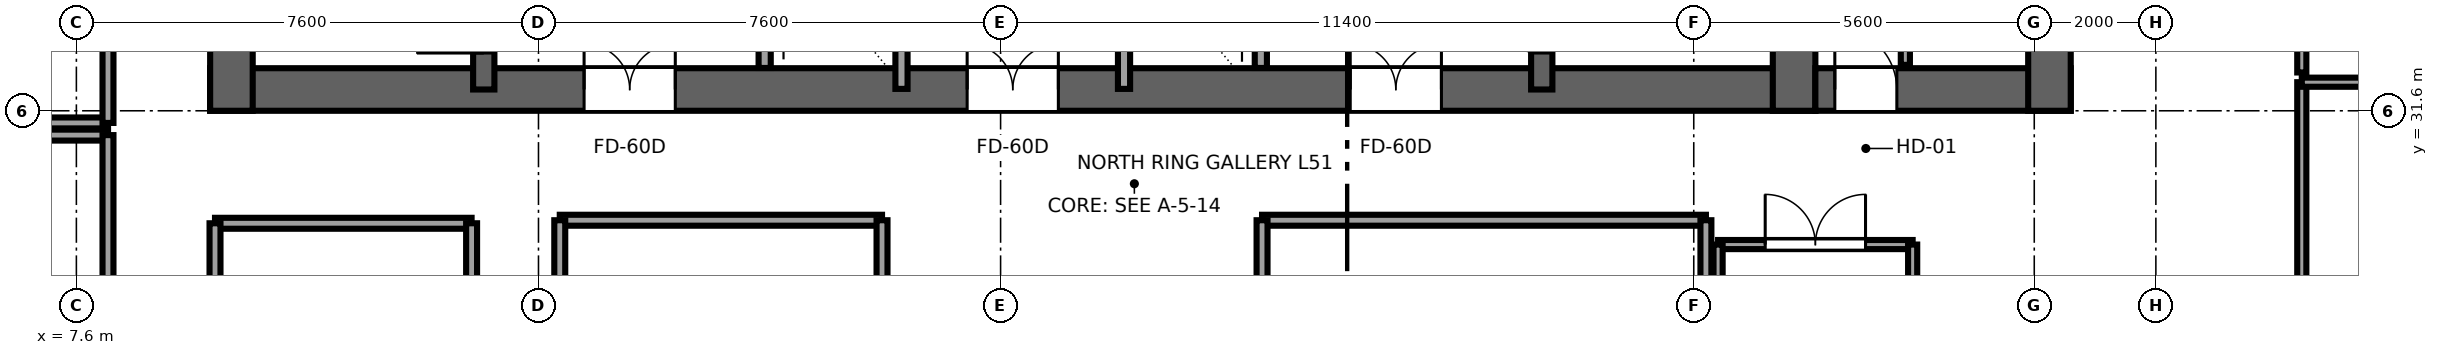
"""IFC4 building model, lengths in metres.
Left out: names, types, materials, properties, quantities, classifications, styles, units other than length and angle.
Written with IfcOpenShell. Run it as: python <this file> out.ifc"""

import sys

from ifc_helpers import new_model, si_unit, direction, frame, frame_2d, origin, place, context, subcontext, project, spatial, rectangle, extrude, source, transform, mapped, element, fill, save


model = new_model("IFC4")
c1 = context("Model", 3, precision=1e-05, world=origin(), true_north=direction((0.0, 1.0)))
c2 = subcontext(c1, "Body", "Model", "MODEL_VIEW")
j1 = project(units=[si_unit("LENGTHUNIT", "METRE"), si_unit("PLANEANGLEUNIT", "RADIAN")], contexts=[c1])
p1 = place(None, origin())
s1 = spatial("IfcSite", under=j1, at=p1, CompositionType="ELEMENT")
p2 = place(p1, origin())
s2 = spatial("IfcBuilding", under=s1, at=p2, CompositionType="ELEMENT")
p3 = place(p2, frame((0.0, 0.0, 194.65)))
s3 = spatial("IfcBuildingStorey", under=s2, at=p3, CompositionType="ELEMENT", Elevation=194.65)
p4 = place(p3, frame((9.8, 31.95, 0.0), z_axis=(0.0, 0.0, 1.0), x_axis=(1.0, 0.0, 0.0)))
e1 = element("IfcWall", 1, at=p4, inside=s3, PredefinedType="SHEAR", context=c2, shape_type="SweptSolid", body=[
    extrude(rectangle(XDim=26.4, YDim=0.7, at=frame_2d((13.2, 0.0))), origin(), (0.0, 0.0, 1.0), 3.55),
])
p5 = place(p4, frame((7.65, 0.0, 0.0), z_axis=(0.0, 0.0, 1.0), x_axis=(-1.0, 0.0, 0.0)))
e2 = element("IfcOpeningElement", 2, at=p5, cuts=e1, PredefinedType="OPENING", context=c2, shape_type="SweptSolid", body=[
    extrude(rectangle(XDim=1.5, YDim=2.04, at=frame_2d((0.75, 1.02))), frame((0.0, 0.36, 0.0), z_axis=(0.0, -1.0, 0.0), x_axis=(1.0, 0.0, 0.0)), (0.0, 0.0, 1.0), 0.72),
])
p6 = place(p4, frame((13.95, 0.0, 0.0), z_axis=(0.0, 0.0, 1.0), x_axis=(-1.0, 0.0, 0.0)))
e3 = element("IfcOpeningElement", 3, at=p6, cuts=e1, PredefinedType="OPENING", context=c2, shape_type="SweptSolid", body=[
    extrude(rectangle(XDim=1.5, YDim=2.04, at=frame_2d((0.75, 1.02))), frame((0.0, 0.36, 0.0), z_axis=(0.0, -1.0, 0.0), x_axis=(1.0, 0.0, 0.0)), (0.0, 0.0, 1.0), 0.72),
])
p7 = place(p4, frame((20.25, 0.0, 0.0), z_axis=(0.0, 0.0, 1.0), x_axis=(-1.0, 0.0, 0.0)))
e4 = element("IfcOpeningElement", 4, at=p7, cuts=e1, PredefinedType="OPENING", context=c2, shape_type="SweptSolid", body=[
    extrude(rectangle(XDim=1.5, YDim=2.04, at=frame_2d((0.75, 1.02))), frame((0.0, 0.36, 0.0), z_axis=(0.0, -1.0, 0.0), x_axis=(1.0, 0.0, 0.0)), (0.0, 0.0, 1.0), 0.72),
])
for number, where, z_axis, x_axis in (
    (5, (10.15, 31.6, 0.0), (0.0, 0.0, 1.0), (0.0, 1.0, 0.0)),
    (6, (35.85, 31.6, 0.0), (0.0, 0.0, 1.0), (0.0, 1.0, 0.0)),
):
    element("IfcWall", number, at=place(p3, frame(where, z_axis=z_axis, x_axis=x_axis)), inside=s3, PredefinedType="SHEAR", context=c2, shape_type="SweptSolid", body=[
        extrude(rectangle(XDim=13.6, YDim=0.7, at=frame_2d((6.8, 0.0))), origin(), (0.0, 0.0, 1.0), 3.55),
    ])
p8 = place(p3, frame((14.3, 31.95, 0.0), z_axis=(0.0, 0.0, 1.0), x_axis=(0.0, 1.0, 0.0)))
e7 = element("IfcWall", 7, at=p8, inside=s3, PredefinedType="SHEAR", context=c2, shape_type="SweptSolid", body=[
    extrude(rectangle(XDim=12.9, YDim=0.35, at=frame_2d((6.45, 0.0))), origin(), (0.0, 0.0, 1.0), 3.55),
])
p9 = place(p8, frame((0.6, 0.0, 0.0)))
e8 = element("IfcOpeningElement", 8, at=p9, cuts=e7, PredefinedType="OPENING", context=c2, shape_type="SweptSolid", body=[
    extrude(rectangle(XDim=1.1, YDim=2.12, at=frame_2d((0.55, 1.06))), frame((0.0, 0.185, 0.0), z_axis=(0.0, -1.0, 0.0), x_axis=(1.0, 0.0, 0.0)), (0.0, 0.0, 1.0), 0.37),
])
p10 = place(p3, frame((31.7, 31.95, 0.0), z_axis=(0.0, 0.0, 1.0), x_axis=(0.0, 1.0, 0.0)))
e9 = element("IfcWall", 9, at=p10, inside=s3, PredefinedType="SHEAR", context=c2, shape_type="SweptSolid", body=[
    extrude(rectangle(XDim=12.9, YDim=0.35, at=frame_2d((6.45, 0.0))), origin(), (0.0, 0.0, 1.0), 3.55),
])
p11 = place(p10, frame((1.7, 0.0, 0.0), z_axis=(0.0, 0.0, 1.0), x_axis=(-1.0, 0.0, 0.0)))
e10 = element("IfcOpeningElement", 10, at=p11, cuts=e9, PredefinedType="OPENING", context=c2, shape_type="SweptSolid", body=[
    extrude(rectangle(XDim=1.1, YDim=2.12, at=frame_2d((0.55, 1.06))), frame((0.0, 0.185, 0.0), z_axis=(0.0, -1.0, 0.0), x_axis=(1.0, 0.0, 0.0)), (0.0, 0.0, 1.0), 0.37),
])
p12 = place(p3, frame((36.2, 31.95, 0.0), z_axis=(0.0, 0.0, 1.0), x_axis=(1.0, 0.0, 0.0)))
e11 = element("IfcWall", 11, at=p12, inside=s3, PredefinedType="SHEAR", context=c2, shape_type="SweptSolid", body=[
    extrude(rectangle(XDim=4.2, YDim=0.7, at=frame_2d((2.1, 0.0))), origin(), (0.0, 0.0, 1.0), 3.55),
])
p13 = place(p12, frame((1.34, 0.0, 0.0), z_axis=(0.0, 0.0, 1.0), x_axis=(-1.0, 0.0, 0.0)))
e12 = element("IfcOpeningElement", 12, at=p13, cuts=e11, PredefinedType="OPENING", context=c2, shape_type="SweptSolid", body=[
    extrude(rectangle(XDim=1.02, YDim=2.03, at=frame_2d((0.51, 1.015))), frame((0.0, 0.36, 0.0), z_axis=(0.0, -1.0, 0.0), x_axis=(1.0, 0.0, 0.0)), (0.0, 0.0, 1.0), 0.72),
])
p14 = place(p3, frame((40.05, 31.6, 0.0), z_axis=(0.0, 0.0, 1.0), x_axis=(0.0, 1.0, 0.0)))
e13 = element("IfcWall", 13, at=p14, inside=s3, PredefinedType="SHEAR", context=c2, shape_type="SweptSolid", body=[
    extrude(rectangle(XDim=13.6, YDim=0.7, at=frame_2d((6.8, 0.0))), origin(), (0.0, 0.0, 1.0), 3.55),
])
for number, where, z_axis, x_axis in (
    (14, (18.92, 32.304, 0.0), (0.0, 0.0, 1.0), (0.0, 1.0, 0.0)),
    (15, (27.08, 32.304, 0.0), (0.0, 0.0, 1.0), (0.0, 1.0, 0.0)),
):
    element("IfcWall", number, at=place(p3, frame(where, z_axis=z_axis, x_axis=x_axis)), inside=s3, PredefinedType="SOLIDWALL", context=c2, shape_type="SweptSolid", body=[
        extrude(rectangle(XDim=3.846, YDim=0.2, at=frame_2d((1.923, 0.0))), origin(), (0.0, 0.0, 1.0), 3.37),
    ])
p15 = place(p3, frame((21.17, 31.96, 0.0), z_axis=(0.0, 0.0, 1.0), x_axis=(0.0, 1.0, 0.0)))
e16 = element("IfcWall", 16, at=p15, inside=s3, PredefinedType="SOLIDWALL", context=c2, shape_type="SweptSolid", body=[
    extrude(rectangle(XDim=12.58, YDim=0.2, at=frame_2d((6.29, 0.0))), origin(), (0.0, 0.0, 1.0), 3.37),
])
p16 = place(p15, frame((5.74, 0.0, 0.0)))
e17 = element("IfcOpeningElement", 17, at=p16, cuts=e16, PredefinedType="OPENING", context=c2, shape_type="SweptSolid", body=[
    extrude(rectangle(XDim=1.1, YDim=2.12, at=frame_2d((0.55, 1.06))), frame((0.0, 0.11, 0.0), z_axis=(0.0, -1.0, 0.0), x_axis=(1.0, 0.0, 0.0)), (0.0, 0.0, 1.0), 0.22),
])
p17 = place(p15, frame((8.24, 0.0, 0.0)))
e18 = element("IfcOpeningElement", 18, at=p17, cuts=e16, PredefinedType="OPENING", context=c2, shape_type="SweptSolid", body=[
    extrude(rectangle(XDim=1.1, YDim=2.12, at=frame_2d((0.55, 1.06))), frame((0.0, 0.11, 0.0), z_axis=(0.0, -1.0, 0.0), x_axis=(1.0, 0.0, 0.0)), (0.0, 0.0, 1.0), 0.22),
])
p18 = place(p3, frame((24.83, 31.96, 0.0), z_axis=(0.0, 0.0, 1.0), x_axis=(0.0, 1.0, 0.0)))
e19 = element("IfcWall", 19, at=p18, inside=s3, PredefinedType="SOLIDWALL", context=c2, shape_type="SweptSolid", body=[
    extrude(rectangle(XDim=12.58, YDim=0.2, at=frame_2d((6.29, 0.0))), origin(), (0.0, 0.0, 1.0), 3.37),
])
p19 = place(p18, frame((5.74, 0.0, 0.0)))
e20 = element("IfcOpeningElement", 20, at=p19, cuts=e19, PredefinedType="OPENING", context=c2, shape_type="SweptSolid", body=[
    extrude(rectangle(XDim=1.1, YDim=2.12, at=frame_2d((0.55, 1.06))), frame((0.0, 0.11, 0.0), z_axis=(0.0, -1.0, 0.0), x_axis=(1.0, 0.0, 0.0)), (0.0, 0.0, 1.0), 0.22),
])
p20 = place(p18, frame((8.24, 0.0, 0.0)))
e21 = element("IfcOpeningElement", 21, at=p20, cuts=e19, PredefinedType="OPENING", context=c2, shape_type="SweptSolid", body=[
    extrude(rectangle(XDim=1.1, YDim=2.12, at=frame_2d((0.55, 1.06))), frame((0.0, 0.11, 0.0), z_axis=(0.0, -1.0, 0.0), x_axis=(1.0, 0.0, 0.0)), (0.0, 0.0, 1.0), 0.22),
])
p21 = place(p3, frame((37.68, 32.355, 0.0), z_axis=(0.0, 0.0, 1.0), x_axis=(0.0, 1.0, 0.0)))
e22 = element("IfcWall", 22, at=p21, inside=s3, PredefinedType="PARTITIONING", context=c2, shape_type="SweptSolid", body=[
    extrude(rectangle(XDim=5.845, YDim=0.15, at=frame_2d((2.922, 0.0))), origin(), (0.0, 0.0, 1.0), 3.37),
])
p22 = place(p21, frame((2.413, 0.0, 0.0)))
e23 = element("IfcOpeningElement", 23, at=p22, cuts=e22, PredefinedType="OPENING", context=c2, shape_type="SweptSolid", body=[
    extrude(rectangle(XDim=1.02, YDim=2.03, at=frame_2d((0.51, 1.015))), frame((0.0, 0.085, 0.0), z_axis=(0.0, -1.0, 0.0), x_axis=(1.0, 0.0, 0.0)), (0.0, 0.0, 1.0), 0.17),
])
p23 = place(p3, frame((2.9, 31.2, 0.0), z_axis=(0.0, 0.0, 1.0), x_axis=(1.0, 0.0, 0.0)))
e24 = element("IfcWall", 24, at=p23, inside=s3, PredefinedType="PARTITIONING", context=c2, shape_type="SweptSolid", body=[
    extrude(rectangle(XDim=5.22, YDim=0.18, at=frame_2d((2.61, 0.0))), origin(), (0.0, 0.0, 1.0), 3.37),
])
p24 = place(p3, frame((8.12, 23.7, 0.0), z_axis=(0.0, 0.0, 1.0), x_axis=(0.0, 1.0, 0.0)))
e25 = element("IfcWall", 25, at=p24, inside=s3, PredefinedType="PARTITIONING", context=c2, shape_type="SweptSolid", body=[
    extrude(rectangle(XDim=7.5, YDim=0.18, at=frame_2d((3.75, 0.0))), origin(), (0.0, 0.0, 1.0), 3.37),
])
p25 = place(p24, frame((2.925, 0.0, 0.0)))
e26 = element("IfcOpeningElement", 26, at=p25, cuts=e25, PredefinedType="OPENING", context=c2, shape_type="SweptSolid", body=[
    extrude(rectangle(XDim=1.65, YDim=2.15, at=frame_2d((0.825, 1.075))), frame((0.0, 0.1, 0.0), z_axis=(0.0, -1.0, 0.0), x_axis=(1.0, 0.0, 0.0)), (0.0, 0.0, 1.0), 0.2),
])
p26 = place(p3, frame((2.9, 31.4, 0.0), z_axis=(0.0, 0.0, 1.0), x_axis=(1.0, 0.0, 0.0)))
e27 = element("IfcWall", 27, at=p26, inside=s3, PredefinedType="PARTITIONING", context=c2, shape_type="SweptSolid", body=[
    extrude(rectangle(XDim=5.22, YDim=0.18, at=frame_2d((2.61, 0.0))), origin(), (0.0, 0.0, 1.0), 3.37),
])
p27 = place(p3, frame((8.12, 31.4, 0.0), z_axis=(0.0, 0.0, 1.0), x_axis=(0.0, 1.0, 0.0)))
e28 = element("IfcWall", 28, at=p27, inside=s3, PredefinedType="PARTITIONING", context=c2, shape_type="SweptSolid", body=[
    extrude(rectangle(XDim=6.8, YDim=0.18, at=frame_2d((3.4, 0.0))), origin(), (0.0, 0.0, 1.0), 3.37),
])
p28 = place(p27, frame((3.175, 0.0, 0.0)))
e29 = element("IfcOpeningElement", 29, at=p28, cuts=e28, PredefinedType="OPENING", context=c2, shape_type="SweptSolid", body=[
    extrude(rectangle(XDim=1.65, YDim=2.15, at=frame_2d((0.825, 1.075))), frame((0.0, 0.1, 0.0), z_axis=(0.0, -1.0, 0.0), x_axis=(1.0, 0.0, 0.0)), (0.0, 0.0, 1.0), 0.2),
])
p29 = place(p3, frame((44.2, 23.78, 0.0), z_axis=(0.0, 0.0, 1.0), x_axis=(0.0, 1.0, 0.0)))
e30 = element("IfcWall", 30, at=p29, inside=s3, PredefinedType="PARTITIONING", context=c2, shape_type="SweptSolid", body=[
    extrude(rectangle(XDim=8.29, YDim=0.15, at=frame_2d((4.145, 0.0))), origin(), (0.0, 0.0, 1.0), 3.37),
])
p30 = place(p29, frame((3.655, 0.0, 0.0)))
e31 = element("IfcOpeningElement", 31, at=p30, cuts=e30, PredefinedType="OPENING", context=c2, shape_type="SweptSolid", body=[
    extrude(rectangle(XDim=0.98, YDim=2.12, at=frame_2d((0.49, 1.06))), frame((0.0, 0.085, 0.0), z_axis=(0.0, -1.0, 0.0), x_axis=(1.0, 0.0, 0.0)), (0.0, 0.0, 1.0), 0.17),
])
p31 = place(p3, frame((44.2, 32.07, 0.0), z_axis=(0.0, 0.0, 1.0), x_axis=(1.0, 0.0, 0.0)))
e32 = element("IfcWall", 32, at=p31, inside=s3, PredefinedType="PARTITIONING", context=c2, shape_type="SweptSolid", body=[
    extrude(rectangle(XDim=7.43, YDim=0.15, at=frame_2d((3.715, 0.0))), origin(), (0.0, 0.0, 1.0), 3.37),
])
p32 = place(p3, frame((44.2, 32.23, 0.0), z_axis=(0.0, 0.0, 1.0), x_axis=(0.0, 1.0, 0.0)))
e33 = element("IfcWall", 33, at=p32, inside=s3, PredefinedType="PARTITIONING", context=c2, shape_type="SweptSolid", body=[
    extrude(rectangle(XDim=8.29, YDim=0.15, at=frame_2d((4.145, 0.0))), origin(), (0.0, 0.0, 1.0), 3.37),
])
p33 = place(p32, frame((3.655, 0.0, 0.0)))
e34 = element("IfcOpeningElement", 34, at=p33, cuts=e33, PredefinedType="OPENING", context=c2, shape_type="SweptSolid", body=[
    extrude(rectangle(XDim=0.98, YDim=2.12, at=frame_2d((0.49, 1.06))), frame((0.0, 0.085, 0.0), z_axis=(0.0, -1.0, 0.0), x_axis=(1.0, 0.0, 0.0)), (0.0, 0.0, 1.0), 0.17),
])
p34 = place(p3, frame((9.88, 29.75, 0.0), z_axis=(0.0, 0.0, 1.0), x_axis=(1.0, 0.0, 0.0)))
e35 = element("IfcWall", 35, at=p34, inside=s3, PredefinedType="PARTITIONING", context=c2, shape_type="SweptSolid", body=[
    extrude(rectangle(XDim=4.22, YDim=0.18, at=frame_2d((2.11, 0.0))), origin(), (0.0, 0.0, 1.0), 3.37),
])
for number, where, z_axis, x_axis in (
    (36, (9.88, 23.7, 0.0), (0.0, 0.0, 1.0), (0.0, 1.0, 0.0)),
    (37, (14.1, 23.7, 0.0), (0.0, 0.0, 1.0), (0.0, 1.0, 0.0)),
):
    element("IfcWall", number, at=place(p3, frame(where, z_axis=z_axis, x_axis=x_axis)), inside=s3, PredefinedType="PARTITIONING", context=c2, shape_type="SweptSolid", body=[
        extrude(rectangle(XDim=6.05, YDim=0.18, at=frame_2d((3.025, 0.0))), origin(), (0.0, 0.0, 1.0), 3.37),
    ])
p35 = place(p3, frame((27.1, 29.8, 0.0), z_axis=(0.0, 0.0, 1.0), x_axis=(1.0, 0.0, 0.0)))
e38 = element("IfcWall", 38, at=p35, inside=s3, PredefinedType="PARTITIONING", context=c2, shape_type="SweptSolid", body=[
    extrude(rectangle(XDim=7.3, YDim=0.18, at=frame_2d((3.65, 0.0))), origin(), (0.0, 0.0, 1.0), 3.37),
])
for number, where, z_axis, x_axis in (
    (39, (27.1, 23.7, 0.0), (0.0, 0.0, 1.0), (0.0, 1.0, 0.0)),
    (40, (34.4, 23.7, 0.0), (0.0, 0.0, 1.0), (0.0, 1.0, 0.0)),
):
    element("IfcWall", number, at=place(p3, frame(where, z_axis=z_axis, x_axis=x_axis)), inside=s3, PredefinedType="PARTITIONING", context=c2, shape_type="SweptSolid", body=[
        extrude(rectangle(XDim=6.1, YDim=0.18, at=frame_2d((3.05, 0.0))), origin(), (0.0, 0.0, 1.0), 3.37),
    ])
p36 = place(p3, frame((15.55, 29.8, 0.0), z_axis=(0.0, 0.0, 1.0), x_axis=(1.0, 0.0, 0.0)))
e41 = element("IfcWall", 41, at=p36, inside=s3, PredefinedType="PARTITIONING", context=c2, shape_type="SweptSolid", body=[
    extrude(rectangle(XDim=5.3, YDim=0.18, at=frame_2d((2.65, 0.0))), origin(), (0.0, 0.0, 1.0), 3.37),
])
for number, where, z_axis, x_axis in (
    (42, (15.55, 23.7, 0.0), (0.0, 0.0, 1.0), (0.0, 1.0, 0.0)),
    (43, (20.85, 23.7, 0.0), (0.0, 0.0, 1.0), (0.0, 1.0, 0.0)),
):
    element("IfcWall", number, at=place(p3, frame(where, z_axis=z_axis, x_axis=x_axis)), inside=s3, PredefinedType="PARTITIONING", context=c2, shape_type="SweptSolid", body=[
        extrude(rectangle(XDim=6.1, YDim=0.18, at=frame_2d((3.05, 0.0))), origin(), (0.0, 0.0, 1.0), 3.37),
    ])
p37 = place(p3, frame((34.6, 29.4, 0.0), z_axis=(0.0, 0.0, 1.0), x_axis=(1.0, 0.0, 0.0)))
e44 = element("IfcWall", 44, at=p37, inside=s3, PredefinedType="PARTITIONING", context=c2, shape_type="SweptSolid", body=[
    extrude(rectangle(XDim=3.2, YDim=0.15, at=frame_2d((1.6, 0.0))), origin(), (0.0, 0.0, 1.0), 3.37),
])
p38 = place(p37, frame((0.775, 0.0, 0.0)))
e45 = element("IfcOpeningElement", 45, at=p38, cuts=e44, PredefinedType="OPENING", context=c2, shape_type="SweptSolid", body=[
    extrude(rectangle(XDim=1.65, YDim=2.15, at=frame_2d((0.825, 1.075))), frame((0.0, 0.085, 0.0), z_axis=(0.0, -1.0, 0.0), x_axis=(1.0, 0.0, 0.0)), (0.0, 0.0, 1.0), 0.17),
])
for number, where, z_axis, x_axis in (
    (46, (34.6, 23.7, 0.0), (0.0, 0.0, 1.0), (0.0, 1.0, 0.0)),
    (47, (37.8, 23.7, 0.0), (0.0, 0.0, 1.0), (0.0, 1.0, 0.0)),
):
    element("IfcWall", number, at=place(p3, frame(where, z_axis=z_axis, x_axis=x_axis)), inside=s3, PredefinedType="PARTITIONING", context=c2, shape_type="SweptSolid", body=[
        extrude(rectangle(XDim=5.7, YDim=0.15, at=frame_2d((2.85, 0.0))), origin(), (0.0, 0.0, 1.0), 3.37),
    ])
m1 = source(origin(), c2, "Body", "SweptSolid", [
    extrude(rectangle(XDim=1.1, YDim=2.12, at=frame_2d((0.55, 1.06))), frame((0.0, 0.025, 0.0), z_axis=(0.0, -1.0, 0.0), x_axis=(1.0, 0.0, 0.0)), (0.0, 0.0, 1.0), 0.05),
])
p39 = place(p9, origin())
e48 = element("IfcDoor", 48, at=p39, inside=s3, OperationType="SINGLE_SWING_LEFT", PredefinedType="DOOR", context=c2, shape_type="MappedRepresentation", body=[
    mapped(m1, transform((0.0, 0.0, 0.0), x_axis=(1.0, 0.0, 0.0), y_axis=(0.0, 1.0, 0.0), z_axis=(0.0, 0.0, 1.0), scale=1.0)),
])
fill(e8, e48)
p40 = place(p11, origin())
e49 = element("IfcDoor", 49, at=p40, inside=s3, OperationType="SINGLE_SWING_RIGHT", PredefinedType="DOOR", context=c2, shape_type="MappedRepresentation", body=[
    mapped(m1, transform((0.0, 0.0, 0.0), x_axis=(1.0, 0.0, 0.0), y_axis=(0.0, 1.0, 0.0), z_axis=(0.0, 0.0, 1.0), scale=1.0)),
])
fill(e10, e49)
m2 = source(origin(), c2, "Body", "SweptSolid", [
    extrude(rectangle(XDim=1.5, YDim=2.04, at=frame_2d((0.75, 1.02))), frame((0.0, 0.025, 0.0), z_axis=(0.0, -1.0, 0.0), x_axis=(1.0, 0.0, 0.0)), (0.0, 0.0, 1.0), 0.05),
])
p41 = place(p5, origin())
e50 = element("IfcDoor", 50, at=p41, inside=s3, OperationType="DOUBLE_DOOR_SINGLE_SWING", PredefinedType="DOOR", context=c2, shape_type="MappedRepresentation", body=[
    mapped(m2, transform((0.0, 0.0, 0.0), x_axis=(1.0, 0.0, 0.0), y_axis=(0.0, 1.0, 0.0), z_axis=(0.0, 0.0, 1.0), scale=1.0)),
])
fill(e2, e50)
p42 = place(p6, origin())
e51 = element("IfcDoor", 51, at=p42, inside=s3, OperationType="DOUBLE_DOOR_SINGLE_SWING", PredefinedType="DOOR", context=c2, shape_type="MappedRepresentation", body=[
    mapped(m2, transform((0.0, 0.0, 0.0), x_axis=(1.0, 0.0, 0.0), y_axis=(0.0, 1.0, 0.0), z_axis=(0.0, 0.0, 1.0), scale=1.0)),
])
fill(e3, e51)
p43 = place(p7, origin())
e52 = element("IfcDoor", 52, at=p43, inside=s3, OperationType="DOUBLE_DOOR_SINGLE_SWING", PredefinedType="DOOR", context=c2, shape_type="MappedRepresentation", body=[
    mapped(m2, transform((0.0, 0.0, 0.0), x_axis=(1.0, 0.0, 0.0), y_axis=(0.0, 1.0, 0.0), z_axis=(0.0, 0.0, 1.0), scale=1.0)),
])
fill(e4, e52)
m3 = source(origin(), c2, "Body", "SweptSolid", [
    extrude(rectangle(XDim=1.02, YDim=2.03, at=frame_2d((0.51, 1.015))), frame((0.0, 0.025, 0.0), z_axis=(0.0, -1.0, 0.0), x_axis=(1.0, 0.0, 0.0)), (0.0, 0.0, 1.0), 0.05),
])
p44 = place(p13, origin())
e53 = element("IfcDoor", 53, at=p44, inside=s3, OperationType="SINGLE_SWING_LEFT", PredefinedType="DOOR", context=c2, shape_type="MappedRepresentation", body=[
    mapped(m3, transform((0.0, 0.0, 0.0), x_axis=(1.0, 0.0, 0.0), y_axis=(0.0, 1.0, 0.0), z_axis=(0.0, 0.0, 1.0), scale=1.0)),
])
fill(e12, e53)
m4 = source(origin(), c2, "Body", "SweptSolid", [
    extrude(rectangle(XDim=1.65, YDim=2.15, at=frame_2d((0.825, 1.075))), frame((0.0, 0.025, 0.0), z_axis=(0.0, -1.0, 0.0), x_axis=(1.0, 0.0, 0.0)), (0.0, 0.0, 1.0), 0.05),
])
p45 = place(p38, origin())
e54 = element("IfcDoor", 54, at=p45, inside=s3, OperationType="DOUBLE_DOOR_SINGLE_SWING", PredefinedType="DOOR", context=c2, shape_type="MappedRepresentation", body=[
    mapped(m4, transform((0.0, 0.0, 0.0), x_axis=(1.0, 0.0, 0.0), y_axis=(0.0, 1.0, 0.0), z_axis=(0.0, 0.0, 1.0), scale=1.0)),
])
fill(e45, e54)
save(model, sys.argv[1])
